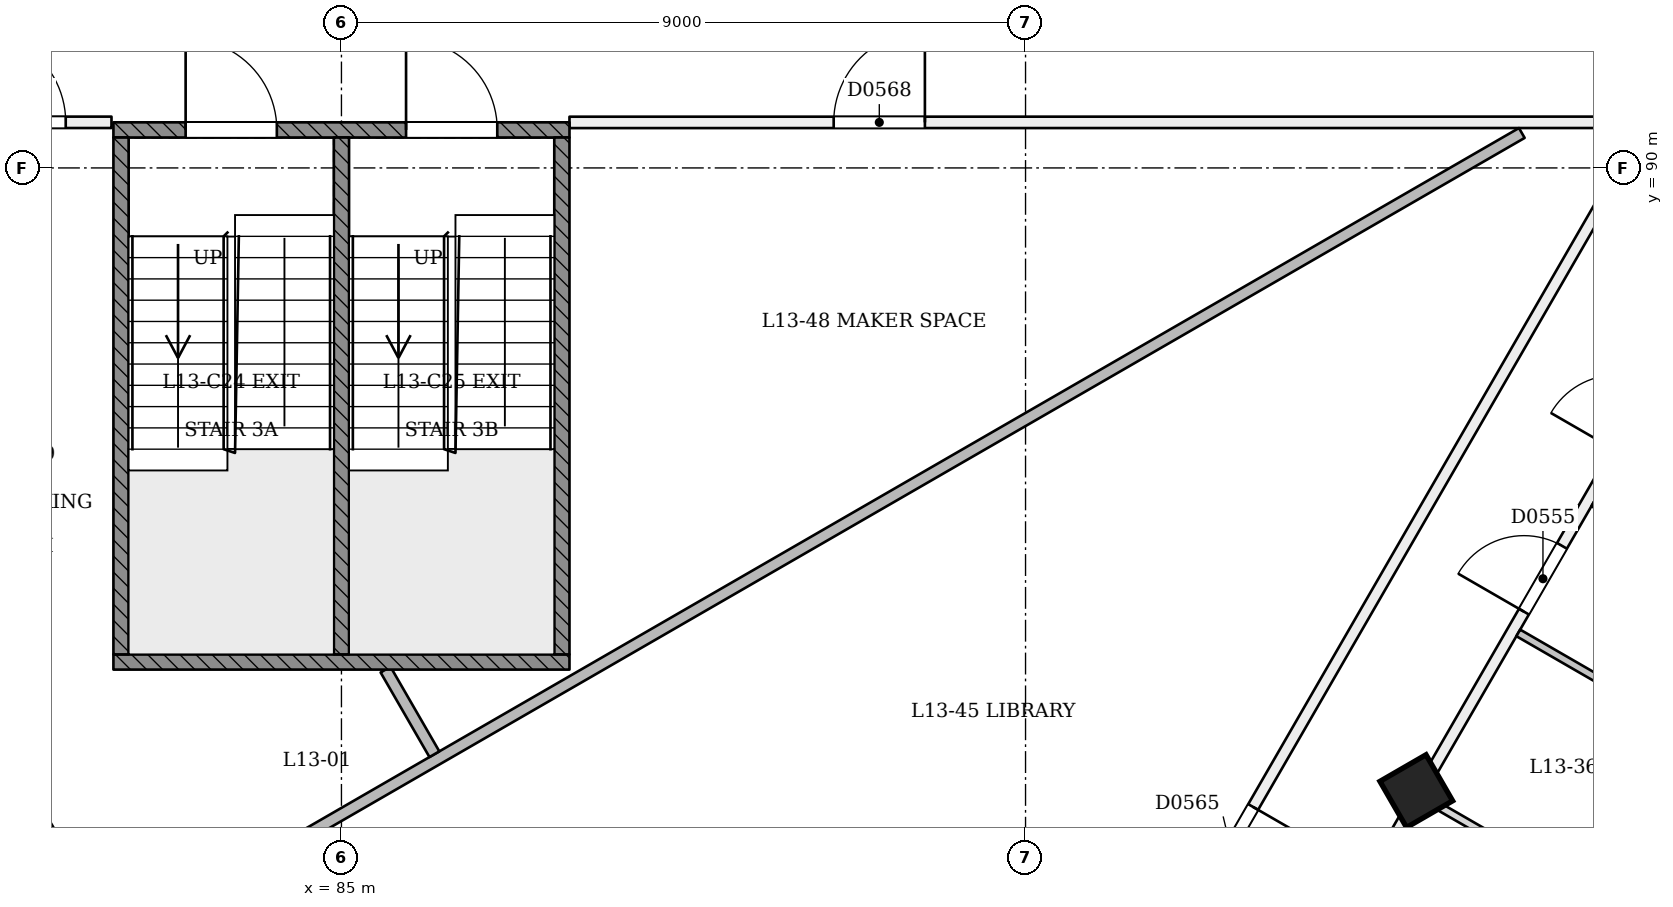
"""IFC4 building model, lengths in metres.
Left out: names, types, materials, properties, quantities, classifications, styles, units other than length and angle.
Written with IfcOpenShell. Run it as: python <this file> out.ifc"""

import sys

from ifc_helpers import new_model, si_unit, direction, frame, frame_2d, origin, origin_2d, place, context, subcontext, project, spatial, rectangle, extrude, element, fill, save


model = new_model("IFC4")
c1 = context("Model", 3, precision=1e-05, world=origin(), true_north=direction((0.0, 1.0)))
c2 = subcontext(c1, "Body", "Model", "MODEL_VIEW")
j1 = project(units=[si_unit("LENGTHUNIT", "METRE"), si_unit("PLANEANGLEUNIT", "RADIAN")], contexts=[c1])
p1 = place(None, origin())
s1 = spatial("IfcSite", under=j1, at=p1, CompositionType="ELEMENT")
p2 = place(p1, origin())
s2 = spatial("IfcBuilding", under=s1, at=p2, CompositionType="ELEMENT")
p3 = place(p2, frame((0.0, 0.0, 55.8)))
s3 = spatial("IfcBuildingStorey", under=s2, at=p3, CompositionType="ELEMENT", Elevation=55.8)
p4 = place(p3, frame((99.168, 81.755, -0.021), z_axis=(-0.022222852987, 0.038483477124, 0.999012095419), x_axis=(-0.500169973044, -0.865642122652, 0.022219665955)))
e1 = element("IfcColumn", 1, at=p4, inside=s3, PredefinedType="COLUMN", context=c2, shape_type="SweptSolid", body=[
    extrude(rectangle(XDim=0.7, YDim=0.7, at=origin_2d()), origin(), (0.0, 0.0, 1.0), 3.604),
])
p5 = place(p3, frame((64.083, 93.447, 0.0), z_axis=(0.0, 0.0, 1.0), x_axis=(0.5000018851, -0.866024315419, 0.0)))
e2 = element("IfcWall", 2, at=p5, inside=s3, PredefinedType="PARTITIONING", context=c2, shape_type="SweptSolid", body=[
    extrude(rectangle(XDim=36.0, YDim=0.15, at=frame_2d((18.0, 0.0))), origin(), (0.0, 0.0, 1.0), 2.7),
])
p6 = place(p5, frame((0.605, 0.0, 0.0)))
e3 = element("IfcOpeningElement", 3, at=p6, cuts=e2, PredefinedType="OPENING", context=c2, shape_type="SweptSolid", body=[
    extrude(rectangle(XDim=1.0, YDim=2.1, at=frame_2d((0.5, 1.05))), frame((0.0, 0.085, 0.0), z_axis=(0.0, -1.0, 0.0), x_axis=(1.0, 0.0, 0.0)), (0.0, 0.0, 1.0), 0.171),
])
p7 = place(p5, frame((7.28, 0.0, 0.0)))
e4 = element("IfcOpeningElement", 4, at=p7, cuts=e2, PredefinedType="OPENING", context=c2, shape_type="SweptSolid", body=[
    extrude(rectangle(XDim=1.0, YDim=2.1, at=frame_2d((0.5, 1.05))), frame((0.0, 0.085, 0.0), z_axis=(0.0, -1.0, 0.0), x_axis=(1.0, 0.0, 0.0)), (0.0, 0.0, 1.0), 0.171),
])
p8 = place(p5, frame((9.72, 0.0, 0.0)))
e5 = element("IfcOpeningElement", 5, at=p8, cuts=e2, PredefinedType="OPENING", context=c2, shape_type="SweptSolid", body=[
    extrude(rectangle(XDim=1.0, YDim=2.1, at=frame_2d((0.5, 1.05))), frame((0.0, 0.085, 0.0), z_axis=(0.0, -1.0, 0.0), x_axis=(1.0, 0.0, 0.0)), (0.0, 0.0, 1.0), 0.171),
])
p9 = place(p5, frame((16.395, 0.0, 0.0)))
e6 = element("IfcOpeningElement", 6, at=p9, cuts=e2, PredefinedType="OPENING", context=c2, shape_type="SweptSolid", body=[
    extrude(rectangle(XDim=1.0, YDim=2.1, at=frame_2d((0.5, 1.05))), frame((0.0, 0.085, 0.0), z_axis=(0.0, -1.0, 0.0), x_axis=(1.0, 0.0, 0.0)), (0.0, 0.0, 1.0), 0.171),
])
p10 = place(p5, frame((18.72, 0.0, 0.0)))
e7 = element("IfcOpeningElement", 7, at=p10, cuts=e2, PredefinedType="OPENING", context=c2, shape_type="SweptSolid", body=[
    extrude(rectangle(XDim=1.0, YDim=2.1, at=frame_2d((0.5, 1.05))), frame((0.0, 0.085, 0.0), z_axis=(0.0, -1.0, 0.0), x_axis=(1.0, 0.0, 0.0)), (0.0, 0.0, 1.0), 0.171),
])
p11 = place(p5, frame((25.395, 0.0, 0.0)))
e8 = element("IfcOpeningElement", 8, at=p11, cuts=e2, PredefinedType="OPENING", context=c2, shape_type="SweptSolid", body=[
    extrude(rectangle(XDim=1.0, YDim=2.1, at=frame_2d((0.5, 1.05))), frame((0.0, 0.085, 0.0), z_axis=(0.0, -1.0, 0.0), x_axis=(1.0, 0.0, 0.0)), (0.0, 0.0, 1.0), 0.171),
])
p12 = place(p5, frame((27.605, 0.0, 0.0)))
e9 = element("IfcOpeningElement", 9, at=p12, cuts=e2, PredefinedType="OPENING", context=c2, shape_type="SweptSolid", body=[
    extrude(rectangle(XDim=1.0, YDim=2.1, at=frame_2d((0.5, 1.05))), frame((0.0, 0.085, 0.0), z_axis=(0.0, -1.0, 0.0), x_axis=(1.0, 0.0, 0.0)), (0.0, 0.0, 1.0), 0.171),
])
p13 = place(p5, frame((34.28, 0.0, 0.0)))
e10 = element("IfcOpeningElement", 10, at=p13, cuts=e2, PredefinedType="OPENING", context=c2, shape_type="SweptSolid", body=[
    extrude(rectangle(XDim=1.0, YDim=2.1, at=frame_2d((0.5, 1.05))), frame((0.0, 0.085, 0.0), z_axis=(0.0, -1.0, 0.0), x_axis=(1.0, 0.0, 0.0)), (0.0, 0.0, 1.0), 0.171),
])
p14 = place(p3, frame((85.99, 58.932, 0.0), z_axis=(0.0, 0.0, 1.0), x_axis=(0.500001547762, 0.866024510182, 0.0)))
e11 = element("IfcWall", 11, at=p14, inside=s3, PredefinedType="PARTITIONING", context=c2, shape_type="SweptSolid", body=[
    extrude(rectangle(XDim=42.454, YDim=0.15, at=frame_2d((21.227, 0.0))), origin(), (0.0, 0.0, 1.0), 2.7),
])
p15 = place(p14, frame((3.577, 0.0, 0.0)))
e12 = element("IfcOpeningElement", 12, at=p15, cuts=e11, PredefinedType="OPENING", context=c2, shape_type="SweptSolid", body=[
    extrude(rectangle(XDim=1.2, YDim=2.1, at=frame_2d((0.6, 1.05))), frame((0.0, 0.085, 0.0), z_axis=(0.0, -1.0, 0.0), x_axis=(1.0, 0.0, 0.0)), (0.0, 0.0, 1.0), 0.171),
])
p16 = place(p14, frame((11.134, 0.0, 0.0)))
e13 = element("IfcOpeningElement", 13, at=p16, cuts=e11, PredefinedType="OPENING", context=c2, shape_type="SweptSolid", body=[
    extrude(rectangle(XDim=1.0, YDim=2.1, at=frame_2d((0.5, 1.05))), frame((0.0, 0.085, 0.0), z_axis=(0.0, -1.0, 0.0), x_axis=(1.0, 0.0, 0.0)), (0.0, 0.0, 1.0), 0.171),
])
p17 = place(p14, frame((13.575, 0.0, 0.0)))
e14 = element("IfcOpeningElement", 14, at=p17, cuts=e11, PredefinedType="OPENING", context=c2, shape_type="SweptSolid", body=[
    extrude(rectangle(XDim=1.0, YDim=2.1, at=frame_2d((0.5, 1.05))), frame((0.0, 0.085, 0.0), z_axis=(0.0, -1.0, 0.0), x_axis=(1.0, 0.0, 0.0)), (0.0, 0.0, 1.0), 0.171),
])
p18 = place(p14, frame((20.134, 0.0, 0.0)))
e15 = element("IfcOpeningElement", 15, at=p18, cuts=e11, PredefinedType="OPENING", context=c2, shape_type="SweptSolid", body=[
    extrude(rectangle(XDim=1.0, YDim=2.1, at=frame_2d((0.5, 1.05))), frame((0.0, 0.085, 0.0), z_axis=(0.0, -1.0, 0.0), x_axis=(1.0, 0.0, 0.0)), (0.0, 0.0, 1.0), 0.171),
])
p19 = place(p14, frame((22.575, 0.0, 0.0)))
e16 = element("IfcOpeningElement", 16, at=p19, cuts=e11, PredefinedType="OPENING", context=c2, shape_type="SweptSolid", body=[
    extrude(rectangle(XDim=1.0, YDim=2.1, at=frame_2d((0.5, 1.05))), frame((0.0, 0.085, 0.0), z_axis=(0.0, -1.0, 0.0), x_axis=(1.0, 0.0, 0.0)), (0.0, 0.0, 1.0), 0.171),
])
p20 = place(p14, frame((29.134, 0.0, 0.0)))
e17 = element("IfcOpeningElement", 17, at=p20, cuts=e11, PredefinedType="OPENING", context=c2, shape_type="SweptSolid", body=[
    extrude(rectangle(XDim=1.0, YDim=2.1, at=frame_2d((0.5, 1.05))), frame((0.0, 0.085, 0.0), z_axis=(0.0, -1.0, 0.0), x_axis=(1.0, 0.0, 0.0)), (0.0, 0.0, 1.0), 0.171),
])
p21 = place(p14, frame((31.575, 0.0, 0.0)))
e18 = element("IfcOpeningElement", 18, at=p21, cuts=e11, PredefinedType="OPENING", context=c2, shape_type="SweptSolid", body=[
    extrude(rectangle(XDim=1.0, YDim=2.1, at=frame_2d((0.5, 1.05))), frame((0.0, 0.085, 0.0), z_axis=(0.0, -1.0, 0.0), x_axis=(1.0, 0.0, 0.0)), (0.0, 0.0, 1.0), 0.171),
])
p22 = place(p14, frame((38.134, 0.0, 0.0)))
e19 = element("IfcOpeningElement", 19, at=p22, cuts=e11, PredefinedType="OPENING", context=c2, shape_type="SweptSolid", body=[
    extrude(rectangle(XDim=1.0, YDim=2.1, at=frame_2d((0.5, 1.05))), frame((0.0, 0.085, 0.0), z_axis=(0.0, -1.0, 0.0), x_axis=(1.0, 0.0, 0.0)), (0.0, 0.0, 1.0), 0.171),
])
p23 = place(p14, frame((41.161, 0.0, 0.0)))
e20 = element("IfcOpeningElement", 20, at=p23, cuts=e11, PredefinedType="OPENING", context=c2, shape_type="SweptSolid", body=[
    extrude(rectangle(XDim=1.0, YDim=2.1, at=frame_2d((0.5, 1.05))), frame((0.0, 0.085, 0.0), z_axis=(0.0, -1.0, 0.0), x_axis=(1.0, 0.0, 0.0)), (0.0, 0.0, 1.0), 0.171),
])
p24 = place(p3, frame((67.935, 90.6, 0.0), z_axis=(0.0, 0.0, 1.0), x_axis=(1.0, 0.0, 0.0)))
e21 = element("IfcWall", 21, at=p24, inside=s3, PredefinedType="PARTITIONING", context=c2, shape_type="SweptSolid", body=[
    extrude(rectangle(XDim=14.04, YDim=0.15, at=frame_2d((7.02, 0.0))), origin(), (0.0, 0.0, 1.0), 3.1),
])
p25 = place(p24, frame((12.238, 0.0, 0.0)))
e22 = element("IfcOpeningElement", 22, at=p25, cuts=e21, PredefinedType="OPENING", context=c2, shape_type="SweptSolid", body=[
    extrude(rectangle(XDim=1.2, YDim=2.1, at=frame_2d((0.6, 1.05))), frame((0.0, 0.085, 0.0), z_axis=(0.0, -1.0, 0.0), x_axis=(1.0, 0.0, 0.0)), (0.0, 0.0, 1.0), 0.171),
])
p26 = place(p3, frame((102.195, 90.6, 0.0), z_axis=(0.0, 0.0, 1.0), x_axis=(-0.499999873444, -0.866025476852, 0.0)))
e23 = element("IfcWall", 23, at=p26, inside=s3, PredefinedType="PARTITIONING", context=c2, shape_type="SweptSolid", body=[
    extrude(rectangle(XDim=17.064, YDim=0.15, at=frame_2d((8.532, 0.0))), origin(), (0.0, 0.0, 1.0), 3.1),
])
p27 = place(p26, frame((10.401, 0.0, 0.0)))
e24 = element("IfcOpeningElement", 24, at=p27, cuts=e23, PredefinedType="OPENING", context=c2, shape_type="SweptSolid", body=[
    extrude(rectangle(XDim=1.2, YDim=2.1, at=frame_2d((0.6, 1.05))), frame((0.0, 0.085, 0.0), z_axis=(0.0, -1.0, 0.0), x_axis=(1.0, 0.0, 0.0)), (0.0, 0.0, 1.0), 0.171),
])
p28 = place(p3, frame((85.0, 60.817, 0.0), z_axis=(0.0, 0.0, 1.0), x_axis=(-0.49999631887, 0.866027529076, 0.0)))
e25 = element("IfcWall", 25, at=p28, inside=s3, PredefinedType="PARTITIONING", context=c2, shape_type="SweptSolid", body=[
    extrude(rectangle(XDim=34.391, YDim=0.15, at=frame_2d((17.195, 0.0))), origin(), (0.0, 0.0, 1.0), 3.1),
])
p29 = place(p28, frame((24.599, 0.0, 0.0)))
e26 = element("IfcOpeningElement", 26, at=p29, cuts=e25, PredefinedType="OPENING", context=c2, shape_type="SweptSolid", body=[
    extrude(rectangle(XDim=1.2, YDim=2.1, at=frame_2d((0.6, 1.05))), frame((0.0, 0.085, 0.0), z_axis=(0.0, -1.0, 0.0), x_axis=(1.0, 0.0, 0.0)), (0.0, 0.0, 1.0), 0.171),
])
p30 = place(p28, frame((7.281, 0.0, 0.0)))
e27 = element("IfcOpeningElement", 27, at=p30, cuts=e25, PredefinedType="OPENING", context=c2, shape_type="SweptSolid", body=[
    extrude(rectangle(XDim=1.2, YDim=2.1, at=frame_2d((0.6, 1.05))), frame((0.0, 0.085, 0.0), z_axis=(0.0, -1.0, 0.0), x_axis=(1.0, 0.0, 0.0)), (0.0, 0.0, 1.0), 0.171),
])
p31 = place(p3, frame((88.0, 90.599, 0.0), z_axis=(0.0, 0.0, 1.0), x_axis=(0.99999999759, 6.942998e-05, 0.0)))
e28 = element("IfcWall", 28, at=p31, inside=s3, PredefinedType="PARTITIONING", context=c2, shape_type="SweptSolid", body=[
    extrude(rectangle(XDim=14.065, YDim=0.15, at=frame_2d((7.033, 0.0))), origin(), (0.0, 0.0, 1.0), 3.1),
])
p32 = place(p31, frame((3.476, 0.0, 0.0)))
e29 = element("IfcOpeningElement", 29, at=p32, cuts=e28, PredefinedType="OPENING", context=c2, shape_type="SweptSolid", body=[
    extrude(rectangle(XDim=1.2, YDim=2.1, at=frame_2d((0.6, 1.05))), frame((0.0, 0.085, 0.0), z_axis=(0.0, -1.0, 0.0), x_axis=(1.0, 0.0, 0.0)), (0.0, 0.0, 1.0), 0.171),
])
p33 = place(p3, frame((101.636, 80.331, 0.0), z_axis=(0.0, 0.0, 1.0), x_axis=(-0.866042014628, 0.499971228071, 0.0)))
e30 = element("IfcWall", 30, at=p33, inside=s3, PredefinedType="PARTITIONING", context=c2, shape_type="SweptSolid", body=[
    extrude(rectangle(XDim=2.775, YDim=0.1, at=frame_2d((1.388, 0.0))), origin(), (0.0, 0.0, 1.0), 2.7),
])
p34 = place(p3, frame((100.482, 83.883, 0.0), z_axis=(0.0, 0.0, 1.0), x_axis=(0.866011447264, -0.500024172624, 0.0)))
e31 = element("IfcWall", 31, at=p34, inside=s3, PredefinedType="PARTITIONING", context=c2, shape_type="SweptSolid", body=[
    extrude(rectangle(XDim=2.825, YDim=0.1, at=frame_2d((1.413, 0.0))), origin(), (0.0, 0.0, 1.0), 3.1),
])
p35 = place(p3, frame((102.929, 82.47, 0.0), z_axis=(0.0, 0.0, 1.0), x_axis=(-0.500004234368, -0.866022959057, 0.0)))
e32 = element("IfcWall", 32, at=p35, inside=s3, PredefinedType="PARTITIONING", context=c2, shape_type="SweptSolid", body=[
    extrude(rectangle(XDim=5.0, YDim=0.1, at=frame_2d((2.5, 0.0))), origin(), (0.0, 0.0, 1.0), 2.7),
])
p36 = place(p35, frame((3.3, 0.0, 0.0)))
e33 = element("IfcOpeningElement", 33, at=p36, cuts=e32, PredefinedType="OPENING", context=c2, shape_type="SweptSolid", body=[
    extrude(rectangle(XDim=0.9, YDim=2.1, at=frame_2d((0.45, 1.05))), frame((0.0, 0.061, 0.0), z_axis=(0.0, -1.0, 0.0), x_axis=(1.0, 0.0, 0.0)), (0.0, 0.0, 1.0), 0.121),
])
p37 = place(p35, frame((0.8, 0.0, 0.0)))
e34 = element("IfcOpeningElement", 34, at=p37, cuts=e32, PredefinedType="OPENING", context=c2, shape_type="SweptSolid", body=[
    extrude(rectangle(XDim=0.9, YDim=2.1, at=frame_2d((0.45, 1.05))), frame((0.0, 0.061, 0.0), z_axis=(0.0, -1.0, 0.0), x_axis=(1.0, 0.0, 0.0)), (0.0, 0.0, 1.0), 0.121),
])
p38 = place(p3, frame((106.978, 82.442, 0.0), z_axis=(0.0, 0.0, 1.0), x_axis=(-0.866025401434, 0.500000004071, 0.0)))
e35 = element("IfcWall", 35, at=p38, inside=s3, PredefinedType="PARTITIONING", context=c2, shape_type="SweptSolid", body=[
    extrude(rectangle(XDim=6.345, YDim=0.15, at=frame_2d((3.173, 0.0))), origin(), (0.0, 0.0, 1.0), 2.6),
])
p39 = place(p3, frame((81.982, 79.838, 0.0), z_axis=(0.0, 0.0, 1.0), x_axis=(-0.500008318019, 0.866020601321, 0.0)))
e36 = element("IfcWall", 36, at=p39, inside=s3, PredefinedType="PARTITIONING", context=c2, shape_type="SweptSolid", body=[
    extrude(rectangle(XDim=12.297, YDim=0.15, at=frame_2d((6.148, 0.0))), origin(), (0.0, 0.0, 1.0), 3.1),
])
p40 = place(p3, frame((100.529, 90.46, 0.0), z_axis=(0.0, 0.0, 1.0), x_axis=(-0.866026416576, -0.499998245789, 0.0)))
e37 = element("IfcWall", 37, at=p40, inside=s3, PredefinedType="PARTITIONING", context=c2, shape_type="SweptSolid", body=[
    extrude(rectangle(XDim=26.59, YDim=0.15, at=frame_2d((13.295, 0.0))), origin(), (0.0, 0.0, 1.0), 3.1),
])
p41 = place(p3, frame((85.58, 83.4, 0.0), z_axis=(0.0, 0.0, 1.0), x_axis=(0.500122526358, -0.865954651601, 0.0)))
e38 = element("IfcWall", 38, at=p41, inside=s3, PredefinedType="PARTITIONING", context=c2, shape_type="SweptSolid", body=[
    extrude(rectangle(XDim=1.285, YDim=0.15, at=frame_2d((0.643, 0.0))), origin(), (0.0, 0.0, 1.0), 3.1),
])
p42 = place(p3, frame((82.0, 90.5, 0.0), z_axis=(0.0, 0.0, 1.0), x_axis=(1.0, 0.0, 0.0)))
e39 = element("IfcWall", 39, at=p42, inside=s3, PredefinedType="SOLIDWALL", context=c2, shape_type="SweptSolid", body=[
    extrude(rectangle(XDim=6.0, YDim=0.2, at=frame_2d((3.0, 0.0))), origin(), (0.0, 0.0, 1.0), 3.1),
])
p43 = place(p42, frame((0.95, 0.0, 0.0)))
e40 = element("IfcOpeningElement", 40, at=p43, cuts=e39, PredefinedType="OPENING", context=c2, shape_type="SweptSolid", body=[
    extrude(rectangle(XDim=1.2, YDim=2.1, at=frame_2d((0.6, 1.05))), frame((0.0, 0.11, 0.0), z_axis=(0.0, -1.0, 0.0), x_axis=(1.0, 0.0, 0.0)), (0.0, 0.0, 1.0), 0.221),
])
p44 = place(p42, frame((3.85, 0.0, 0.0)))
e41 = element("IfcOpeningElement", 41, at=p44, cuts=e39, PredefinedType="OPENING", context=c2, shape_type="SweptSolid", body=[
    extrude(rectangle(XDim=1.2, YDim=2.1, at=frame_2d((0.6, 1.05))), frame((0.0, 0.11, 0.0), z_axis=(0.0, -1.0, 0.0), x_axis=(1.0, 0.0, 0.0)), (0.0, 0.0, 1.0), 0.221),
])
p45 = place(p3, frame((82.0, 83.5, 0.0), z_axis=(0.0, 0.0, 1.0), x_axis=(1.0, 0.0, 0.0)))
e42 = element("IfcWall", 42, at=p45, inside=s3, PredefinedType="SOLIDWALL", context=c2, shape_type="SweptSolid", body=[
    extrude(rectangle(XDim=6.0, YDim=0.2, at=frame_2d((3.0, 0.0))), origin(), (0.0, 0.0, 1.0), 3.1),
])
for number, where, z_axis, x_axis in (
    (43, (82.1, 83.6, 0.0), (0.0, 0.0, 1.0), (0.0, 1.0, 0.0)),
    (44, (87.9, 83.6, 0.0), (0.0, 0.0, 1.0), (0.0, 1.0, 0.0)),
    (45, (85.0, 83.6, 0.0), (0.0, 0.0, 1.0), (0.0, 1.0, 0.0)),
):
    element("IfcWall", number, at=place(p3, frame(where, z_axis=z_axis, x_axis=x_axis)), inside=s3, PredefinedType="SOLIDWALL", context=c2, shape_type="SweptSolid", body=[
        extrude(rectangle(XDim=6.8, YDim=0.2, at=frame_2d((3.4, 0.0))), origin(), (0.0, 0.0, 1.0), 3.1),
    ])
p46 = place(p20, origin())
e46 = element("IfcDoor", 46, at=p46, inside=s3, OperationType="SINGLE_SWING_LEFT", PredefinedType="NOTDEFINED", context=c2, shape_type="SweptSolid", body=[
    extrude(rectangle(XDim=1.0, YDim=2.1, at=frame_2d((0.5, 1.05))), frame((0.0, 0.025, 0.0), z_axis=(0.0, -1.0, 0.0), x_axis=(1.0, 0.0, 0.0)), (0.0, 0.0, 1.0), 0.05),
])
fill(e17, e46)
p47 = place(p27, origin())
e47 = element("IfcDoor", 47, at=p47, inside=s3, OperationType="SINGLE_SWING_LEFT", PredefinedType="NOTDEFINED", context=c2, shape_type="SweptSolid", body=[
    extrude(rectangle(XDim=1.2, YDim=2.1, at=frame_2d((0.6, 1.05))), frame((0.0, 0.025, 0.0), z_axis=(0.0, -1.0, 0.0), x_axis=(1.0, 0.0, 0.0)), (0.0, 0.0, 1.0), 0.05),
])
fill(e24, e47)
p48 = place(p32, origin())
e48 = element("IfcDoor", 48, at=p48, inside=s3, OperationType="SINGLE_SWING_RIGHT", PredefinedType="NOTDEFINED", context=c2, shape_type="SweptSolid", body=[
    extrude(rectangle(XDim=1.2, YDim=2.1, at=frame_2d((0.6, 1.05))), frame((0.0, 0.025, 0.0), z_axis=(0.0, -1.0, 0.0), x_axis=(1.0, 0.0, 0.0)), (0.0, 0.0, 1.0), 0.05),
])
fill(e29, e48)
p49 = place(p25, origin())
e49 = element("IfcDoor", 49, at=p49, inside=s3, OperationType="SINGLE_SWING_LEFT", PredefinedType="NOTDEFINED", context=c2, shape_type="SweptSolid", body=[
    extrude(rectangle(XDim=1.2, YDim=2.1, at=frame_2d((0.6, 1.05))), frame((0.0, 0.025, 0.0), z_axis=(0.0, -1.0, 0.0), x_axis=(1.0, 0.0, 0.0)), (0.0, 0.0, 1.0), 0.05),
])
fill(e22, e49)
p50 = place(p43, origin())
e50 = element("IfcDoor", 50, at=p50, inside=s3, OperationType="SINGLE_SWING_LEFT", PredefinedType="NOTDEFINED", context=c2, shape_type="SweptSolid", body=[
    extrude(rectangle(XDim=1.2, YDim=2.1, at=frame_2d((0.6, 1.05))), frame((0.0, 0.025, 0.0), z_axis=(0.0, -1.0, 0.0), x_axis=(1.0, 0.0, 0.0)), (0.0, 0.0, 1.0), 0.05),
])
fill(e40, e50)
p51 = place(p44, origin())
e51 = element("IfcDoor", 51, at=p51, inside=s3, OperationType="SINGLE_SWING_LEFT", PredefinedType="NOTDEFINED", context=c2, shape_type="SweptSolid", body=[
    extrude(rectangle(XDim=1.2, YDim=2.1, at=frame_2d((0.6, 1.05))), frame((0.0, 0.025, 0.0), z_axis=(0.0, -1.0, 0.0), x_axis=(1.0, 0.0, 0.0)), (0.0, 0.0, 1.0), 0.05),
])
fill(e41, e51)
save(model, sys.argv[1])
